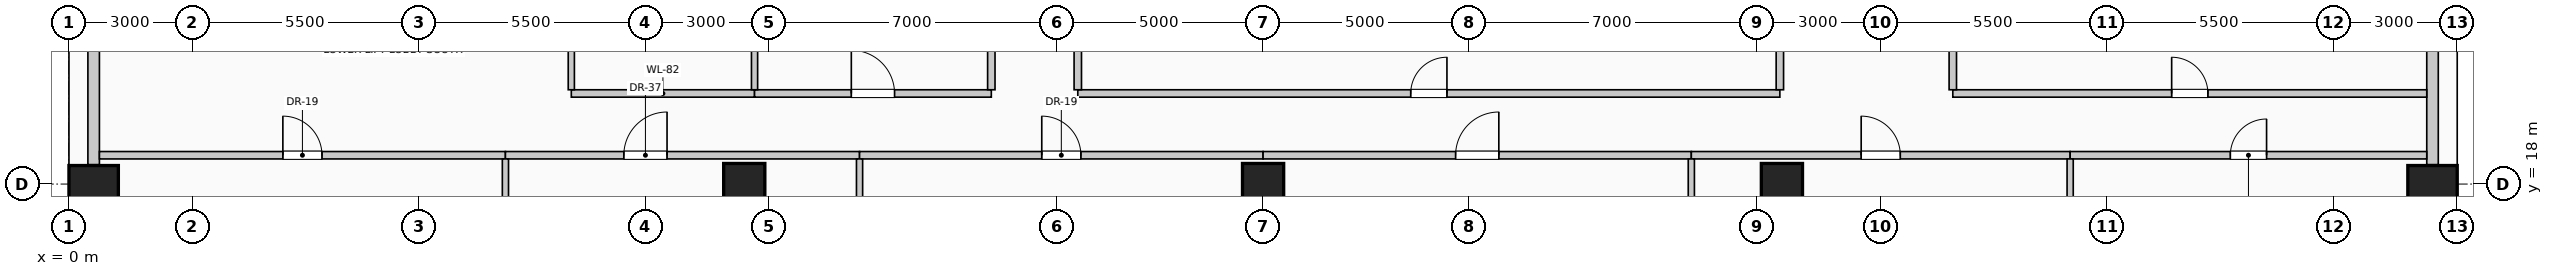
"""IFC4 building model, lengths in metres.
Left out: names, types, materials, properties, quantities, classifications, styles, units other than length and angle.
Written with IfcOpenShell. Run it as: python <this file> out.ifc"""

import sys

from ifc_helpers import new_model, si_unit, direction, frame, frame_2d, origin, origin_2d, place, context, subcontext, project, spatial, rectangle, circle, extrude, element, fill, save


model = new_model("IFC4")
c1 = context("Model", 3, precision=1e-05, world=origin(), true_north=direction((0.0, 1.0)))
c2 = subcontext(c1, "Body", "Model", "MODEL_VIEW")
j1 = project(units=[si_unit("LENGTHUNIT", "METRE"), si_unit("PLANEANGLEUNIT", "RADIAN")], contexts=[c1])
p1 = place(None, origin())
s1 = spatial("IfcSite", under=j1, at=p1, CompositionType="ELEMENT")
p2 = place(p1, origin())
s2 = spatial("IfcBuilding", under=s1, at=p2, CompositionType="ELEMENT")
p3 = place(p2, frame((0.0, 0.0, 78.6)))
s3 = spatial("IfcBuildingStorey", under=s2, at=p3, CompositionType="ELEMENT", Elevation=78.6)
for number, where, z_axis, x_axis in (
    (1, (0.6, 18.0, 0.0), (0.0, 0.0, 1.0), (0.0, 1.0, 0.0)),
    (2, (57.4, 18.0, 0.0), (0.0, 0.0, 1.0), (0.0, 1.0, 0.0)),
):
    element("IfcColumn", number, at=place(p3, frame(where, z_axis=z_axis, x_axis=x_axis)), inside=s3, PredefinedType="COLUMN", context=c2, shape_type="SweptSolid", body=[
        extrude(rectangle(XDim=0.9, YDim=1.2, at=origin_2d()), origin(), (0.0, 0.0, 1.0), 4.0),
    ])
for number, where, z_axis, x_axis in (
    (3, (16.4, 18.0, 0.0), (0.0, 0.0, 1.0), (1.0, 0.0, 0.0)),
    (4, (29.0, 18.0, 0.0), (0.0, 0.0, 1.0), (1.0, 0.0, 0.0)),
    (5, (41.6, 18.0, 0.0), (0.0, 0.0, 1.0), (1.0, 0.0, 0.0)),
):
    element("IfcColumn", number, at=place(p3, frame(where, z_axis=z_axis, x_axis=x_axis)), inside=s3, PredefinedType="COLUMN", context=c2, shape_type="SweptSolid", body=[
        extrude(circle(Radius=0.5, at=origin_2d()), origin(), (0.0, 0.0, 1.0), 4.0),
    ])
for number, where, z_axis, x_axis in (
    (6, (0.6, 18.47, 0.0), (0.0, 0.0, 1.0), (0.0, 1.0, 0.0)),
    (7, (57.4, 25.53, 0.0), (0.0, 0.0, 1.0), (0.0, -1.0, 0.0)),
):
    element("IfcWall", number, at=place(p3, frame(where, z_axis=z_axis, x_axis=x_axis)), inside=s3, PredefinedType="SOLIDWALL", context=c2, shape_type="SweptSolid", body=[
        extrude(rectangle(XDim=7.06, YDim=0.28, at=frame_2d((3.53, 0.0))), origin(), (0.0, 0.0, 1.0), 2.81),
    ])
p4 = place(p3, frame((0.74, 18.7, 0.0), z_axis=(0.0, 0.0, 1.0), x_axis=(1.0, 0.0, 0.0)))
e8 = element("IfcWall", 8, at=p4, inside=s3, PredefinedType="PARTITIONING", context=c2, shape_type="SweptSolid", body=[
    extrude(rectangle(XDim=9.86, YDim=0.18, at=frame_2d((4.93, 0.0))), origin(), (0.0, 0.0, 1.0), 3.66),
])
p5 = place(p4, frame((4.455, 0.0, 0.0)))
e9 = element("IfcOpeningElement", 9, at=p5, cuts=e8, PredefinedType="OPENING", context=c2, shape_type="SweptSolid", body=[
    extrude(rectangle(XDim=0.95, YDim=2.15, at=frame_2d((0.475, 1.075))), frame((0.0, 0.1, 0.0), z_axis=(0.0, -1.0, 0.0), x_axis=(1.0, 0.0, 0.0)), (0.0, 0.0, 1.0), 0.2),
])
p6 = place(p3, frame((10.6, 18.7, 0.0), z_axis=(0.0, 0.0, 1.0), x_axis=(1.0, 0.0, 0.0)))
e10 = element("IfcWall", 10, at=p6, inside=s3, PredefinedType="PARTITIONING", context=c2, shape_type="SweptSolid", body=[
    extrude(rectangle(XDim=8.6, YDim=0.18, at=frame_2d((4.3, 0.0))), origin(), (0.0, 0.0, 1.0), 3.66),
])
p7 = place(p6, frame((2.875, 0.0, 0.0)))
e11 = element("IfcOpeningElement", 11, at=p7, cuts=e10, PredefinedType="OPENING", context=c2, shape_type="SweptSolid", body=[
    extrude(rectangle(XDim=1.05, YDim=2.15, at=frame_2d((0.525, 1.075))), frame((0.0, 0.1, 0.0), z_axis=(0.0, -1.0, 0.0), x_axis=(1.0, 0.0, 0.0)), (0.0, 0.0, 1.0), 0.2),
])
p8 = place(p3, frame((19.2, 18.7, 0.0), z_axis=(0.0, 0.0, 1.0), x_axis=(1.0, 0.0, 0.0)))
e12 = element("IfcWall", 12, at=p8, inside=s3, PredefinedType="PARTITIONING", context=c2, shape_type="SweptSolid", body=[
    extrude(rectangle(XDim=9.8, YDim=0.18, at=frame_2d((4.9, 0.0))), origin(), (0.0, 0.0, 1.0), 3.66),
])
p9 = place(p8, frame((4.425, 0.0, 0.0)))
e13 = element("IfcOpeningElement", 13, at=p9, cuts=e12, PredefinedType="OPENING", context=c2, shape_type="SweptSolid", body=[
    extrude(rectangle(XDim=0.95, YDim=2.15, at=frame_2d((0.475, 1.075))), frame((0.0, 0.1, 0.0), z_axis=(0.0, -1.0, 0.0), x_axis=(1.0, 0.0, 0.0)), (0.0, 0.0, 1.0), 0.2),
])
p10 = place(p3, frame((29.0, 18.7, 0.0), z_axis=(0.0, 0.0, 1.0), x_axis=(1.0, 0.0, 0.0)))
e14 = element("IfcWall", 14, at=p10, inside=s3, PredefinedType="PARTITIONING", context=c2, shape_type="SweptSolid", body=[
    extrude(rectangle(XDim=10.4, YDim=0.18, at=frame_2d((5.2, 0.0))), origin(), (0.0, 0.0, 1.0), 3.66),
])
p11 = place(p10, frame((4.675, 0.0, 0.0)))
e15 = element("IfcOpeningElement", 15, at=p11, cuts=e14, PredefinedType="OPENING", context=c2, shape_type="SweptSolid", body=[
    extrude(rectangle(XDim=1.05, YDim=2.15, at=frame_2d((0.525, 1.075))), frame((0.0, 0.1, 0.0), z_axis=(0.0, -1.0, 0.0), x_axis=(1.0, 0.0, 0.0)), (0.0, 0.0, 1.0), 0.2),
])
p12 = place(p3, frame((39.4, 18.7, 0.0), z_axis=(0.0, 0.0, 1.0), x_axis=(1.0, 0.0, 0.0)))
e16 = element("IfcWall", 16, at=p12, inside=s3, PredefinedType="PARTITIONING", context=c2, shape_type="SweptSolid", body=[
    extrude(rectangle(XDim=9.2, YDim=0.18, at=frame_2d((4.6, 0.0))), origin(), (0.0, 0.0, 1.0), 3.66),
])
p13 = place(p12, frame((4.125, 0.0, 0.0)))
e17 = element("IfcOpeningElement", 17, at=p13, cuts=e16, PredefinedType="OPENING", context=c2, shape_type="SweptSolid", body=[
    extrude(rectangle(XDim=0.95, YDim=2.15, at=frame_2d((0.475, 1.075))), frame((0.0, 0.1, 0.0), z_axis=(0.0, -1.0, 0.0), x_axis=(1.0, 0.0, 0.0)), (0.0, 0.0, 1.0), 0.2),
])
p14 = place(p3, frame((48.6, 18.7, 0.0), z_axis=(0.0, 0.0, 1.0), x_axis=(1.0, 0.0, 0.0)))
e18 = element("IfcWall", 18, at=p14, inside=s3, PredefinedType="PARTITIONING", context=c2, shape_type="SweptSolid", body=[
    extrude(rectangle(XDim=8.66, YDim=0.18, at=frame_2d((4.33, 0.0))), origin(), (0.0, 0.0, 1.0), 3.66),
])
p15 = place(p14, frame((3.89, 0.0, 0.0)))
e19 = element("IfcOpeningElement", 19, at=p15, cuts=e18, PredefinedType="OPENING", context=c2, shape_type="SweptSolid", body=[
    extrude(rectangle(XDim=0.88, YDim=2.1, at=frame_2d((0.44, 1.05))), frame((0.0, 0.1, 0.0), z_axis=(0.0, -1.0, 0.0), x_axis=(1.0, 0.0, 0.0)), (0.0, 0.0, 1.0), 0.2),
])
p16 = place(p3, frame((12.2, 20.2, 0.0), z_axis=(0.0, 0.0, 1.0), x_axis=(1.0, 0.0, 0.0)))
e20 = element("IfcWall", 20, at=p16, inside=s3, PredefinedType="PARTITIONING", context=c2, shape_type="SweptSolid", body=[
    extrude(rectangle(XDim=4.45, YDim=0.18, at=frame_2d((2.225, 0.0))), origin(), (0.0, 0.0, 1.0), 3.66),
])
p17 = place(p3, frame((16.65, 20.2, 0.0), z_axis=(0.0, 0.0, 1.0), x_axis=(1.0, 0.0, 0.0)))
e21 = element("IfcWall", 21, at=p17, inside=s3, PredefinedType="PARTITIONING", context=c2, shape_type="SweptSolid", body=[
    extrude(rectangle(XDim=5.75, YDim=0.18, at=frame_2d((2.875, 0.0))), origin(), (0.0, 0.0, 1.0), 3.66),
])
p18 = place(p17, frame((2.35, 0.0, 0.0)))
e22 = element("IfcOpeningElement", 22, at=p18, cuts=e21, PredefinedType="OPENING", context=c2, shape_type="SweptSolid", body=[
    extrude(rectangle(XDim=1.05, YDim=2.15, at=frame_2d((0.525, 1.075))), frame((0.0, 0.1, 0.0), z_axis=(0.0, -1.0, 0.0), x_axis=(1.0, 0.0, 0.0)), (0.0, 0.0, 1.0), 0.2),
])
p19 = place(p3, frame((24.5, 20.2, 0.0), z_axis=(0.0, 0.0, 1.0), x_axis=(1.0, 0.0, 0.0)))
e23 = element("IfcWall", 23, at=p19, inside=s3, PredefinedType="PARTITIONING", context=c2, shape_type="SweptSolid", body=[
    extrude(rectangle(XDim=17.05, YDim=0.18, at=frame_2d((8.525, 0.0))), origin(), (0.0, 0.0, 1.0), 3.66),
])
p20 = place(p19, frame((8.085, 0.0, 0.0)))
e24 = element("IfcOpeningElement", 24, at=p20, cuts=e23, PredefinedType="OPENING", context=c2, shape_type="SweptSolid", body=[
    extrude(rectangle(XDim=0.88, YDim=2.1, at=frame_2d((0.44, 1.05))), frame((0.0, 0.1, 0.0), z_axis=(0.0, -1.0, 0.0), x_axis=(1.0, 0.0, 0.0)), (0.0, 0.0, 1.0), 0.2),
])
p21 = place(p3, frame((45.75, 20.2, 0.0), z_axis=(0.0, 0.0, 1.0), x_axis=(1.0, 0.0, 0.0)))
e25 = element("IfcWall", 25, at=p21, inside=s3, PredefinedType="PARTITIONING", context=c2, shape_type="SweptSolid", body=[
    extrude(rectangle(XDim=11.51, YDim=0.18, at=frame_2d((5.755, 0.0))), origin(), (0.0, 0.0, 1.0), 3.66),
])
p22 = place(p21, frame((5.315, 0.0, 0.0)))
e26 = element("IfcOpeningElement", 26, at=p22, cuts=e25, PredefinedType="OPENING", context=c2, shape_type="SweptSolid", body=[
    extrude(rectangle(XDim=0.88, YDim=2.1, at=frame_2d((0.44, 1.05))), frame((0.0, 0.1, 0.0), z_axis=(0.0, -1.0, 0.0), x_axis=(1.0, 0.0, 0.0)), (0.0, 0.0, 1.0), 0.2),
])
p23 = place(p3, frame((10.6, 0.74, 0.0), z_axis=(0.0, 0.0, 1.0), x_axis=(0.0, 1.0, 0.0)))
e27 = element("IfcWall", 27, at=p23, inside=s3, PredefinedType="PARTITIONING", context=c2, shape_type="SweptSolid", body=[
    extrude(rectangle(XDim=17.87, YDim=0.15, at=frame_2d((8.935, 0.0))), origin(), (0.0, 0.0, 1.0), 3.66),
])
p24 = place(p3, frame((12.2, 20.29, 0.0), z_axis=(0.0, 0.0, 1.0), x_axis=(0.0, 1.0, 0.0)))
e28 = element("IfcWall", 28, at=p24, inside=s3, PredefinedType="PARTITIONING", context=c2, shape_type="SweptSolid", body=[
    extrude(rectangle(XDim=1.81, YDim=0.15, at=frame_2d((0.905, 0.0))), origin(), (0.0, 0.0, 1.0), 3.66),
])
p25 = place(p3, frame((16.65, 20.29, 0.0), z_axis=(0.0, 0.0, 1.0), x_axis=(0.0, 1.0, 0.0)))
e29 = element("IfcWall", 29, at=p25, inside=s3, PredefinedType="PARTITIONING", context=c2, shape_type="SweptSolid", body=[
    extrude(rectangle(XDim=3.035, YDim=0.15, at=frame_2d((1.518, 0.0))), origin(), (0.0, 0.0, 1.0), 2.955),
])
p26 = place(p3, frame((19.2, 0.74, 0.0), z_axis=(0.0, 0.0, 1.0), x_axis=(0.0, 1.0, 0.0)))
e30 = element("IfcWall", 30, at=p26, inside=s3, PredefinedType="PARTITIONING", context=c2, shape_type="SweptSolid", body=[
    extrude(rectangle(XDim=17.87, YDim=0.15, at=frame_2d((8.935, 0.0))), origin(), (0.0, 0.0, 1.0), 3.66),
])
p27 = place(p3, frame((22.4, 20.29, 0.0), z_axis=(0.0, 0.0, 1.0), x_axis=(0.0, 1.0, 0.0)))
e31 = element("IfcWall", 31, at=p27, inside=s3, PredefinedType="PARTITIONING", context=c2, shape_type="SweptSolid", body=[
    extrude(rectangle(XDim=3.035, YDim=0.18, at=frame_2d((1.518, 0.0))), origin(), (0.0, 0.0, 1.0), 3.66),
])
p28 = place(p3, frame((24.5, 20.29, 0.0), z_axis=(0.0, 0.0, 1.0), x_axis=(0.0, 1.0, 0.0)))
e32 = element("IfcWall", 32, at=p28, inside=s3, PredefinedType="PARTITIONING", context=c2, shape_type="SweptSolid", body=[
    extrude(rectangle(XDim=5.02, YDim=0.18, at=frame_2d((2.51, 0.0))), origin(), (0.0, 0.0, 1.0), 3.66),
])
p29 = place(p3, frame((39.4, 0.74, 0.0), z_axis=(0.0, 0.0, 1.0), x_axis=(0.0, 1.0, 0.0)))
e33 = element("IfcWall", 33, at=p29, inside=s3, PredefinedType="PARTITIONING", context=c2, shape_type="SweptSolid", body=[
    extrude(rectangle(XDim=17.87, YDim=0.15, at=frame_2d((8.935, 0.0))), origin(), (0.0, 0.0, 1.0), 3.66),
])
p30 = place(p3, frame((41.55, 20.29, 0.0), z_axis=(0.0, 0.0, 1.0), x_axis=(0.0, 1.0, 0.0)))
e34 = element("IfcWall", 34, at=p30, inside=s3, PredefinedType="PARTITIONING", context=c2, shape_type="SweptSolid", body=[
    extrude(rectangle(XDim=5.035, YDim=0.18, at=frame_2d((2.518, 0.0))), origin(), (0.0, 0.0, 1.0), 2.955),
])
p31 = place(p3, frame((45.75, 20.29, 0.0), z_axis=(0.0, 0.0, 1.0), x_axis=(0.0, 1.0, 0.0)))
e35 = element("IfcWall", 35, at=p31, inside=s3, PredefinedType="PARTITIONING", context=c2, shape_type="SweptSolid", body=[
    extrude(rectangle(XDim=5.905, YDim=0.18, at=frame_2d((2.953, 0.0))), origin(), (0.0, 0.0, 1.0), 3.66),
])
p32 = place(p3, frame((48.6, 0.74, 0.0), z_axis=(0.0, 0.0, 1.0), x_axis=(0.0, 1.0, 0.0)))
e36 = element("IfcWall", 36, at=p32, inside=s3, PredefinedType="PARTITIONING", context=c2, shape_type="SweptSolid", body=[
    extrude(rectangle(XDim=17.87, YDim=0.15, at=frame_2d((8.935, 0.0))), origin(), (0.0, 0.0, 1.0), 3.66),
])
p33 = place(p5, origin())
e37 = element("IfcDoor", 37, at=p33, inside=s3, OperationType="SINGLE_SWING_LEFT", PredefinedType="DOOR", context=c2, shape_type="SweptSolid", body=[
    extrude(rectangle(XDim=0.95, YDim=2.15, at=frame_2d((0.475, 1.075))), frame((0.0, 0.025, 0.0), z_axis=(0.0, -1.0, 0.0), x_axis=(1.0, 0.0, 0.0)), (0.0, 0.0, 1.0), 0.05),
])
fill(e9, e37)
p34 = place(p7, origin())
e38 = element("IfcDoor", 38, at=p34, inside=s3, OperationType="SINGLE_SWING_RIGHT", PredefinedType="DOOR", context=c2, shape_type="SweptSolid", body=[
    extrude(rectangle(XDim=1.05, YDim=2.15, at=frame_2d((0.525, 1.075))), frame((0.0, 0.025, 0.0), z_axis=(0.0, -1.0, 0.0), x_axis=(1.0, 0.0, 0.0)), (0.0, 0.0, 1.0), 0.05),
])
fill(e11, e38)
p35 = place(p9, origin())
e39 = element("IfcDoor", 39, at=p35, inside=s3, OperationType="SINGLE_SWING_LEFT", PredefinedType="DOOR", context=c2, shape_type="SweptSolid", body=[
    extrude(rectangle(XDim=0.95, YDim=2.15, at=frame_2d((0.475, 1.075))), frame((0.0, 0.025, 0.0), z_axis=(0.0, -1.0, 0.0), x_axis=(1.0, 0.0, 0.0)), (0.0, 0.0, 1.0), 0.05),
])
fill(e13, e39)
p36 = place(p11, origin())
e40 = element("IfcDoor", 40, at=p36, inside=s3, OperationType="SINGLE_SWING_RIGHT", PredefinedType="DOOR", context=c2, shape_type="SweptSolid", body=[
    extrude(rectangle(XDim=1.05, YDim=2.15, at=frame_2d((0.525, 1.075))), frame((0.0, 0.025, 0.0), z_axis=(0.0, -1.0, 0.0), x_axis=(1.0, 0.0, 0.0)), (0.0, 0.0, 1.0), 0.05),
])
fill(e15, e40)
p37 = place(p13, origin())
e41 = element("IfcDoor", 41, at=p37, inside=s3, OperationType="SINGLE_SWING_LEFT", PredefinedType="DOOR", context=c2, shape_type="SweptSolid", body=[
    extrude(rectangle(XDim=0.95, YDim=2.15, at=frame_2d((0.475, 1.075))), frame((0.0, 0.025, 0.0), z_axis=(0.0, -1.0, 0.0), x_axis=(1.0, 0.0, 0.0)), (0.0, 0.0, 1.0), 0.05),
])
fill(e17, e41)
p38 = place(p15, origin())
e42 = element("IfcDoor", 42, at=p38, inside=s3, OperationType="SINGLE_SWING_RIGHT", PredefinedType="DOOR", context=c2, shape_type="SweptSolid", body=[
    extrude(rectangle(XDim=0.88, YDim=2.1, at=frame_2d((0.44, 1.05))), frame((0.0, 0.025, 0.0), z_axis=(0.0, -1.0, 0.0), x_axis=(1.0, 0.0, 0.0)), (0.0, 0.0, 1.0), 0.05),
])
fill(e19, e42)
p39 = place(p18, origin())
e43 = element("IfcDoor", 43, at=p39, inside=s3, OperationType="SINGLE_SWING_LEFT", PredefinedType="DOOR", context=c2, shape_type="SweptSolid", body=[
    extrude(rectangle(XDim=1.05, YDim=2.15, at=frame_2d((0.525, 1.075))), frame((0.0, 0.025, 0.0), z_axis=(0.0, -1.0, 0.0), x_axis=(1.0, 0.0, 0.0)), (0.0, 0.0, 1.0), 0.05),
])
fill(e22, e43)
p40 = place(p20, origin())
e44 = element("IfcDoor", 44, at=p40, inside=s3, OperationType="SINGLE_SWING_RIGHT", PredefinedType="DOOR", context=c2, shape_type="SweptSolid", body=[
    extrude(rectangle(XDim=0.88, YDim=2.1, at=frame_2d((0.44, 1.05))), frame((0.0, 0.025, 0.0), z_axis=(0.0, -1.0, 0.0), x_axis=(1.0, 0.0, 0.0)), (0.0, 0.0, 1.0), 0.05),
])
fill(e24, e44)
p41 = place(p22, origin())
e45 = element("IfcDoor", 45, at=p41, inside=s3, OperationType="SINGLE_SWING_LEFT", PredefinedType="DOOR", context=c2, shape_type="SweptSolid", body=[
    extrude(rectangle(XDim=0.88, YDim=2.1, at=frame_2d((0.44, 1.05))), frame((0.0, 0.025, 0.0), z_axis=(0.0, -1.0, 0.0), x_axis=(1.0, 0.0, 0.0)), (0.0, 0.0, 1.0), 0.05),
])
fill(e26, e45)
save(model, sys.argv[1])
